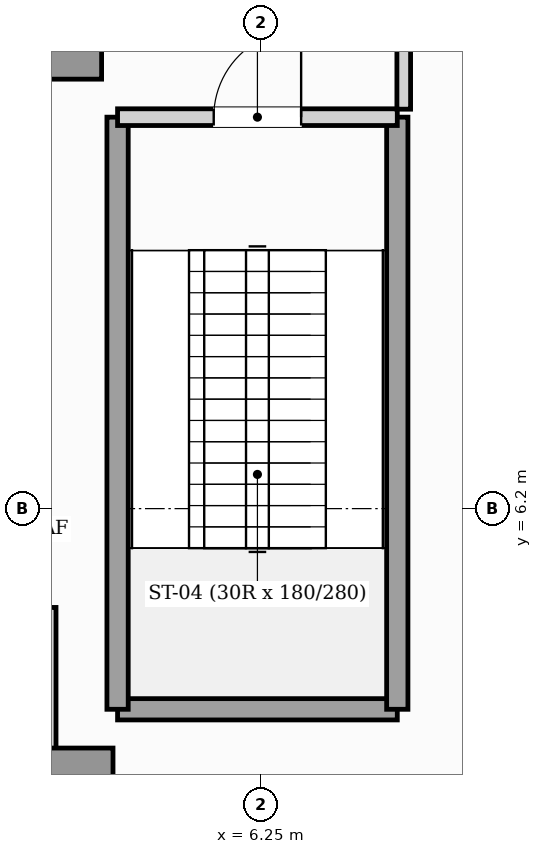
"""IFC4 building model, lengths in metres.
Left out: names, types, materials, properties, quantities, classifications, styles, units other than length and angle.
Written with IfcOpenShell. Run it as: python <this file> out.ifc"""

import sys

from ifc_helpers import new_model, si_unit, direction, frame, frame_2d, origin, origin_2d, place, context, subcontext, project, spatial, rectangle, hollow_rectangle, extrude, element, fill, save


model = new_model("IFC4")
c1 = context("Model", 3, precision=1e-05, world=origin(), true_north=direction((0.0, 1.0)))
c2 = subcontext(c1, "Body", "Model", "MODEL_VIEW")
j1 = project(units=[si_unit("LENGTHUNIT", "METRE"), si_unit("PLANEANGLEUNIT", "RADIAN")], contexts=[c1])
p1 = place(None, origin())
s1 = spatial("IfcSite", under=j1, at=p1, CompositionType="ELEMENT")
p2 = place(p1, origin())
s2 = spatial("IfcBuilding", under=s1, at=p2, CompositionType="ELEMENT")
p3 = place(p2, origin())
s3 = spatial("IfcBuildingStorey", under=s2, at=p3, CompositionType="ELEMENT", Elevation=0.0)
p4 = place(p3, frame((3.6, 2.35, 0.0), z_axis=(0.0, 0.0, 1.0), x_axis=(1.0, 0.0, 0.0)))
e1 = element("IfcColumn", 1, at=p4, inside=s3, PredefinedType="USERDEFINED", context=c2, shape_type="SweptSolid", body=[
    extrude(hollow_rectangle(XDim=1.4, YDim=1.4, WallThickness=0.08, at=origin_2d()), origin(), (0.0, 0.0, 1.0), 5.4),
])
p5 = place(p3, frame((3.6, 12.4, 0.0), z_axis=(0.0, 0.0, 1.0), x_axis=(1.0, 0.0, 0.0)))
e2 = element("IfcColumn", 2, at=p5, inside=s3, PredefinedType="COLUMN", context=c2, shape_type="SweptSolid", body=[
    extrude(rectangle(XDim=1.1, YDim=1.1, at=origin_2d()), origin(), (0.0, 0.0, 1.0), 5.4),
])
p6 = place(p3, frame((3.44, 2.2, 0.0), z_axis=(0.0, 0.0, 1.0), x_axis=(0.0, 1.0, 0.0)))
e3 = element("IfcWall", 3, at=p6, inside=s3, PredefinedType="SOLIDWALL", context=c2, shape_type="SweptSolid", body=[
    extrude(rectangle(XDim=2.7, YDim=0.22, at=frame_2d((1.35, 0.0))), origin(), (0.0, 0.0, 1.0), 4.483),
])
p7 = place(p3, frame((4.36, 3.56, 0.0), z_axis=(0.0, 0.0, 1.0), x_axis=(1.0, 0.0, 0.0)))
e4 = element("IfcWall", 4, at=p7, inside=s3, PredefinedType="SHEAR", context=c2, shape_type="SweptSolid", body=[
    extrude(rectangle(XDim=3.68, YDim=0.28, at=frame_2d((1.84, 0.0))), origin(), (0.0, 0.0, 1.0), 5.1),
])
for number, where, z_axis, x_axis in (
    (5, (4.36, 3.56, 0.0), (0.0, 0.0, 1.0), (0.0, 1.0, 0.0)),
    (6, (8.04, 3.56, 0.0), (0.0, 0.0, 1.0), (0.0, 1.0, 0.0)),
):
    element("IfcWall", number, at=place(p3, frame(where, z_axis=z_axis, x_axis=x_axis)), inside=s3, PredefinedType="SHEAR", context=c2, shape_type="SweptSolid", body=[
        extrude(rectangle(XDim=7.79, YDim=0.28, at=frame_2d((3.895, 0.0))), origin(), (0.0, 0.0, 1.0), 5.1),
    ])
p8 = place(p3, frame((4.36, 11.35, 0.0), z_axis=(0.0, 0.0, 1.0), x_axis=(1.0, 0.0, 0.0)))
e7 = element("IfcWall", 7, at=p8, inside=s3, PredefinedType="SOLIDWALL", context=c2, shape_type="SweptSolid", body=[
    extrude(rectangle(XDim=3.68, YDim=0.22, at=frame_2d((1.84, 0.0))), origin(), (0.0, 0.0, 1.0), 5.1),
])
p9 = place(p8, frame((1.265, 0.0, 0.0)))
e8 = element("IfcOpeningElement", 8, at=p9, cuts=e7, PredefinedType="OPENING", context=c2, shape_type="SweptSolid", body=[
    extrude(rectangle(XDim=1.15, YDim=2.2, at=frame_2d((0.575, 1.1))), frame((0.0, 0.12, 0.0), z_axis=(0.0, -1.0, 0.0), x_axis=(1.0, 0.0, 0.0)), (0.0, 0.0, 1.0), 0.24),
])
p10 = place(p3, frame((8.125, 11.455, 0.0), z_axis=(0.0, 0.0, 1.0), x_axis=(0.0, 1.0, 0.0)))
e9 = element("IfcWall", 9, at=p10, inside=s3, PredefinedType="PARTITIONING", context=c2, shape_type="SweptSolid", body=[
    extrude(rectangle(XDim=3.49, YDim=0.18, at=frame_2d((1.745, 0.0))), origin(), (0.0, 0.0, 1.0), 5.1),
])
p11 = place(p10, frame((1.245, 0.0, 0.0)))
e10 = element("IfcOpeningElement", 10, at=p11, cuts=e9, PredefinedType="OPENING", context=c2, shape_type="SweptSolid", body=[
    extrude(rectangle(XDim=1.0, YDim=2.15, at=frame_2d((0.5, 1.075))), frame((0.0, 0.1, 0.0), z_axis=(0.0, -1.0, 0.0), x_axis=(1.0, 0.0, 0.0)), (0.0, 0.0, 1.0), 0.2),
])
p12 = place(p9, origin())
e11 = element("IfcDoor", 11, at=p12, inside=s3, OperationType="SINGLE_SWING_RIGHT", PredefinedType="DOOR", context=c2, shape_type="SweptSolid", body=[
    extrude(rectangle(XDim=1.15, YDim=2.2, at=frame_2d((0.575, 1.1))), frame((0.0, 0.025, 0.0), z_axis=(0.0, -1.0, 0.0), x_axis=(1.0, 0.0, 0.0)), (0.0, 0.0, 1.0), 0.05),
])
fill(e8, e11)
save(model, sys.argv[1])
